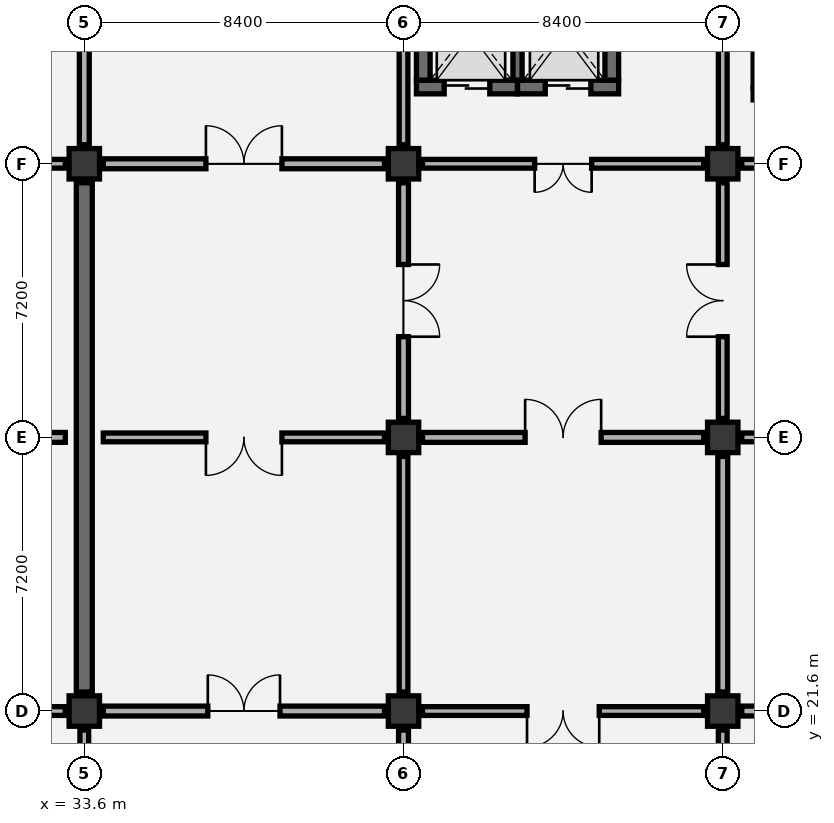
"""IFC4 building model, lengths in metres.
Left out: names, types, materials, properties, quantities, classifications, styles, units other than length and angle.
Written with IfcOpenShell. Run it as: python <this file> out.ifc"""

import sys

from ifc_helpers import new_model, si_unit, direction, frame, frame_2d, origin, origin_2d, place, context, subcontext, project, spatial, rectangle, extrude, element, fill, save


model = new_model("IFC4")
c1 = context("Model", 3, precision=1e-05, world=origin(), true_north=direction((0.0, 1.0)))
c2 = subcontext(c1, "Body", "Model", "MODEL_VIEW")
j1 = project(units=[si_unit("LENGTHUNIT", "METRE"), si_unit("PLANEANGLEUNIT", "RADIAN")], contexts=[c1])
p1 = place(None, origin())
s1 = spatial("IfcSite", under=j1, at=p1, CompositionType="ELEMENT")
p2 = place(p1, origin())
s2 = spatial("IfcBuilding", under=s1, at=p2, CompositionType="ELEMENT")
p3 = place(p2, frame((0.0, 0.0, -9.6)))
s3 = spatial("IfcBuildingStorey", under=s2, at=p3, CompositionType="ELEMENT", Elevation=-9.6)
for number, where, z_axis, x_axis in (
    (1, (33.6, 21.6, 0.0), (0.0, 0.0, 1.0), (1.0, 0.0, 0.0)),
    (2, (33.6, 36.0, 0.0), (0.0, 0.0, 1.0), (1.0, 0.0, 0.0)),
    (3, (42.0, 21.6, 0.0), (0.0, 0.0, 1.0), (1.0, 0.0, 0.0)),
    (4, (42.0, 28.8, 0.0), (0.0, 0.0, 1.0), (1.0, 0.0, 0.0)),
    (5, (42.0, 36.0, 0.0), (0.0, 0.0, 1.0), (1.0, 0.0, 0.0)),
    (6, (50.4, 21.6, 0.0), (0.0, 0.0, 1.0), (1.0, 0.0, 0.0)),
    (7, (50.4, 28.8, 0.0), (0.0, 0.0, 1.0), (1.0, 0.0, 0.0)),
    (8, (50.4, 36.0, 0.0), (0.0, 0.0, 1.0), (1.0, 0.0, 0.0)),
):
    element("IfcColumn", number, at=place(p3, frame(where, z_axis=z_axis, x_axis=x_axis)), inside=s3, PredefinedType="COLUMN", context=c2, shape_type="SweptSolid", body=[
        extrude(rectangle(XDim=0.8, YDim=0.8, at=origin_2d()), origin(), (0.0, 0.0, 1.0), 4.8),
    ])
p4 = place(p3, frame((33.6, 22.1, 0.0), z_axis=(0.0, 0.0, 1.0), x_axis=(0.0, 1.0, 0.0)))
e9 = element("IfcWall", 9, at=p4, inside=s3, PredefinedType="SHEAR", context=c2, shape_type="SweptSolid", body=[
    extrude(rectangle(XDim=13.4, YDim=0.42, at=frame_2d((6.7, 0.0))), origin(), (0.0, 0.0, 1.0), 3.9),
])
p5 = place(p3, frame((51.2, 37.84, 0.0), z_axis=(0.0, 0.0, 1.0), x_axis=(1.0, 0.0, 0.0)))
e10 = element("IfcWall", 10, at=p5, inside=s3, PredefinedType="SHEAR", context=c2, shape_type="SweptSolid", body=[
    extrude(rectangle(XDim=7.48, YDim=0.32, at=frame_2d((3.74, 0.0))), origin(), (0.0, 0.0, 1.0), 4.4),
])
p6 = place(p5, frame((0.45, 0.0, 0.0)))
e11 = element("IfcOpeningElement", 11, at=p6, cuts=e10, PredefinedType="OPENING", context=c2, shape_type="SweptSolid", body=[
    extrude(rectangle(XDim=1.05, YDim=2.15, at=frame_2d((0.525, 1.075))), frame((0.0, 0.17, 0.0), z_axis=(0.0, -1.0, 0.0), x_axis=(1.0, 0.0, 0.0)), (0.0, 0.0, 1.0), 0.34),
])
p7 = place(p3, frame((51.36, 38.0, 0.0), z_axis=(0.0, 0.0, 1.0), x_axis=(0.0, 1.0, 0.0)))
e12 = element("IfcWall", 12, at=p7, inside=s3, PredefinedType="SHEAR", context=c2, shape_type="SweptSolid", body=[
    extrude(rectangle(XDim=3.8, YDim=0.32, at=frame_2d((1.9, 0.0))), origin(), (0.0, 0.0, 1.0), 4.4),
])
p8 = place(p3, frame((42.34, 38.02, -0.75), z_axis=(0.0, 0.0, 1.0), x_axis=(1.0, 0.0, 0.0)))
e13 = element("IfcWall", 13, at=p8, inside=s3, PredefinedType="SHEAR", context=c2, shape_type="SweptSolid", body=[
    extrude(rectangle(XDim=2.66, YDim=0.36, at=frame_2d((1.33, 0.0))), origin(), (0.0, 0.0, 1.0), 5.15),
])
p9 = place(p8, frame((0.73, 0.0, 0.75)))
e14 = element("IfcOpeningElement", 14, at=p9, cuts=e13, PredefinedType="OPENING", context=c2, shape_type="SweptSolid", body=[
    extrude(rectangle(XDim=1.2, YDim=2.15, at=frame_2d((0.6, 1.075))), frame((0.0, 0.19, 0.0), z_axis=(0.0, -1.0, 0.0), x_axis=(1.0, 0.0, 0.0)), (0.0, 0.0, 1.0), 0.38),
])
p10 = place(p3, frame((45.0, 38.02, -0.75), z_axis=(0.0, 0.0, 1.0), x_axis=(1.0, 0.0, 0.0)))
e15 = element("IfcWall", 15, at=p10, inside=s3, PredefinedType="SHEAR", context=c2, shape_type="SweptSolid", body=[
    extrude(rectangle(XDim=2.66, YDim=0.36, at=frame_2d((1.33, 0.0))), origin(), (0.0, 0.0, 1.0), 5.15),
])
p11 = place(p10, frame((0.73, 0.0, 0.75)))
e16 = element("IfcOpeningElement", 16, at=p11, cuts=e15, PredefinedType="OPENING", context=c2, shape_type="SweptSolid", body=[
    extrude(rectangle(XDim=1.2, YDim=2.15, at=frame_2d((0.6, 1.075))), frame((0.0, 0.19, 0.0), z_axis=(0.0, -1.0, 0.0), x_axis=(1.0, 0.0, 0.0)), (0.0, 0.0, 1.0), 0.38),
])
for number, where, z_axis, x_axis in (
    (17, (42.52, 38.2, -0.75), (0.0, 0.0, 1.0), (0.0, 1.0, 0.0)),
    (18, (47.48, 38.2, -0.75), (0.0, 0.0, 1.0), (0.0, 1.0, 0.0)),
):
    element("IfcWall", number, at=place(p3, frame(where, z_axis=z_axis, x_axis=x_axis)), inside=s3, PredefinedType="SHEAR", context=c2, shape_type="SweptSolid", body=[
        extrude(rectangle(XDim=2.8, YDim=0.36, at=frame_2d((1.4, 0.0))), origin(), (0.0, 0.0, 1.0), 5.15),
    ])
p12 = place(p3, frame((45.0, 38.2, -0.75), z_axis=(0.0, 0.0, 1.0), x_axis=(0.0, 1.0, 0.0)))
e19 = element("IfcWall", 19, at=p12, inside=s3, PredefinedType="SHEAR", context=c2, shape_type="SweptSolid", body=[
    extrude(rectangle(XDim=2.8, YDim=0.24, at=frame_2d((1.4, 0.0))), origin(), (0.0, 0.0, 1.0), 5.15),
])
p13 = place(p3, frame((33.6, 14.9, 0.0), z_axis=(0.0, 0.0, 1.0), x_axis=(0.0, 1.0, 0.0)))
e20 = element("IfcWall", 20, at=p13, inside=s3, PredefinedType="PARTITIONING", context=c2, shape_type="SweptSolid", body=[
    extrude(rectangle(XDim=6.2, YDim=0.23, at=frame_2d((3.1, 0.0))), origin(), (0.0, 0.0, 1.0), 3.595),
])
p14 = place(p3, frame((25.7, 21.6, 0.0), z_axis=(0.0, 0.0, 1.0), x_axis=(1.0, 0.0, 0.0)))
e21 = element("IfcWall", 21, at=p14, inside=s3, PredefinedType="PARTITIONING", context=c2, shape_type="SweptSolid", body=[
    extrude(rectangle(XDim=7.4, YDim=0.23, at=frame_2d((3.7, 0.0))), origin(), (0.0, 0.0, 1.0), 2.995),
])
p15 = place(p14, frame((2.7, 0.0, 0.0)))
e22 = element("IfcOpeningElement", 22, at=p15, cuts=e21, PredefinedType="OPENING", context=c2, shape_type="SweptSolid", body=[
    extrude(rectangle(XDim=2.0, YDim=2.35, at=frame_2d((1.0, 1.175))), frame((0.0, 0.125, 0.0), z_axis=(0.0, -1.0, 0.0), x_axis=(1.0, 0.0, 0.0)), (0.0, 0.0, 1.0), 0.25),
])
p16 = place(p3, frame((25.7, 28.8, 0.0), z_axis=(0.0, 0.0, 1.0), x_axis=(1.0, 0.0, 0.0)))
e23 = element("IfcWall", 23, at=p16, inside=s3, PredefinedType="PARTITIONING", context=c2, shape_type="SweptSolid", body=[
    extrude(rectangle(XDim=7.4, YDim=0.26, at=frame_2d((3.7, 0.0))), origin(), (0.0, 0.0, 1.0), 3.9),
])
p17 = place(p3, frame((25.7, 36.0, 0.0), z_axis=(0.0, 0.0, 1.0), x_axis=(1.0, 0.0, 0.0)))
e24 = element("IfcWall", 24, at=p17, inside=s3, PredefinedType="PARTITIONING", context=c2, shape_type="SweptSolid", body=[
    extrude(rectangle(XDim=7.4, YDim=0.23, at=frame_2d((3.7, 0.0))), origin(), (0.0, 0.0, 1.0), 2.995),
])
p18 = place(p17, frame((2.75, 0.0, 0.0)))
e25 = element("IfcOpeningElement", 25, at=p18, cuts=e24, PredefinedType="OPENING", context=c2, shape_type="SweptSolid", body=[
    extrude(rectangle(XDim=1.9, YDim=2.3, at=frame_2d((0.95, 1.15))), frame((0.0, 0.125, 0.0), z_axis=(0.0, -1.0, 0.0), x_axis=(1.0, 0.0, 0.0)), (0.0, 0.0, 1.0), 0.25),
])
p19 = place(p3, frame((33.6, 36.5, 0.0), z_axis=(0.0, 0.0, 1.0), x_axis=(0.0, 1.0, 0.0)))
e26 = element("IfcWall", 26, at=p19, inside=s3, PredefinedType="PARTITIONING", context=c2, shape_type="SweptSolid", body=[
    extrude(rectangle(XDim=6.2, YDim=0.26, at=frame_2d((3.1, 0.0))), origin(), (0.0, 0.0, 1.0), 3.595),
])
p20 = place(p3, frame((42.0, 14.9, 0.0), z_axis=(0.0, 0.0, 1.0), x_axis=(0.0, 1.0, 0.0)))
e27 = element("IfcWall", 27, at=p20, inside=s3, PredefinedType="PARTITIONING", context=c2, shape_type="SweptSolid", body=[
    extrude(rectangle(XDim=6.2, YDim=0.26, at=frame_2d((3.1, 0.0))), origin(), (0.0, 0.0, 1.0), 3.595),
])
p21 = place(p3, frame((34.1, 21.6, 0.0), z_axis=(0.0, 0.0, 1.0), x_axis=(1.0, 0.0, 0.0)))
e28 = element("IfcWall", 28, at=p21, inside=s3, PredefinedType="PARTITIONING", context=c2, shape_type="SweptSolid", body=[
    extrude(rectangle(XDim=7.4, YDim=0.26, at=frame_2d((3.7, 0.0))), origin(), (0.0, 0.0, 1.0), 2.995),
])
p22 = place(p21, frame((2.75, 0.0, 0.0)))
e29 = element("IfcOpeningElement", 29, at=p22, cuts=e28, PredefinedType="OPENING", context=c2, shape_type="SweptSolid", body=[
    extrude(rectangle(XDim=1.9, YDim=2.3, at=frame_2d((0.95, 1.15))), frame((0.0, 0.14, 0.0), z_axis=(0.0, -1.0, 0.0), x_axis=(1.0, 0.0, 0.0)), (0.0, 0.0, 1.0), 0.28),
])
p23 = place(p3, frame((42.0, 22.1, 0.0), z_axis=(0.0, 0.0, 1.0), x_axis=(0.0, 1.0, 0.0)))
e30 = element("IfcWall", 30, at=p23, inside=s3, PredefinedType="PARTITIONING", context=c2, shape_type="SweptSolid", body=[
    extrude(rectangle(XDim=6.2, YDim=0.23, at=frame_2d((3.1, 0.0))), origin(), (0.0, 0.0, 1.0), 3.095),
])
p24 = place(p3, frame((34.1, 28.8, 0.0), z_axis=(0.0, 0.0, 1.0), x_axis=(1.0, 0.0, 0.0)))
e31 = element("IfcWall", 31, at=p24, inside=s3, PredefinedType="PARTITIONING", context=c2, shape_type="SweptSolid", body=[
    extrude(rectangle(XDim=7.4, YDim=0.23, at=frame_2d((3.7, 0.0))), origin(), (0.0, 0.0, 1.0), 3.9),
])
p25 = place(p24, frame((2.7, 0.0, 0.0)))
e32 = element("IfcOpeningElement", 32, at=p25, cuts=e31, PredefinedType="OPENING", context=c2, shape_type="SweptSolid", body=[
    extrude(rectangle(XDim=2.0, YDim=2.35, at=frame_2d((1.0, 1.175))), frame((0.0, 0.125, 0.0), z_axis=(0.0, -1.0, 0.0), x_axis=(1.0, 0.0, 0.0)), (0.0, 0.0, 1.0), 0.25),
])
p26 = place(p3, frame((42.0, 29.3, 0.0), z_axis=(0.0, 0.0, 1.0), x_axis=(0.0, 1.0, 0.0)))
e33 = element("IfcWall", 33, at=p26, inside=s3, PredefinedType="PARTITIONING", context=c2, shape_type="SweptSolid", body=[
    extrude(rectangle(XDim=6.2, YDim=0.26, at=frame_2d((3.1, 0.0))), origin(), (0.0, 0.0, 1.0), 3.095),
])
p27 = place(p26, frame((2.15, 0.0, 0.0)))
e34 = element("IfcOpeningElement", 34, at=p27, cuts=e33, PredefinedType="OPENING", context=c2, shape_type="SweptSolid", body=[
    extrude(rectangle(XDim=1.9, YDim=2.3, at=frame_2d((0.95, 1.15))), frame((0.0, 0.14, 0.0), z_axis=(0.0, -1.0, 0.0), x_axis=(1.0, 0.0, 0.0)), (0.0, 0.0, 1.0), 0.28),
])
p28 = place(p3, frame((34.1, 36.0, 0.0), z_axis=(0.0, 0.0, 1.0), x_axis=(1.0, 0.0, 0.0)))
e35 = element("IfcWall", 35, at=p28, inside=s3, PredefinedType="PARTITIONING", context=c2, shape_type="SweptSolid", body=[
    extrude(rectangle(XDim=7.4, YDim=0.26, at=frame_2d((3.7, 0.0))), origin(), (0.0, 0.0, 1.0), 2.995),
])
p29 = place(p28, frame((2.7, 0.0, 0.0)))
e36 = element("IfcOpeningElement", 36, at=p29, cuts=e35, PredefinedType="OPENING", context=c2, shape_type="SweptSolid", body=[
    extrude(rectangle(XDim=2.0, YDim=2.35, at=frame_2d((1.0, 1.175))), frame((0.0, 0.14, 0.0), z_axis=(0.0, -1.0, 0.0), x_axis=(1.0, 0.0, 0.0)), (0.0, 0.0, 1.0), 0.28),
])
p30 = place(p3, frame((42.0, 36.5, 0.0), z_axis=(0.0, 0.0, 1.0), x_axis=(0.0, 1.0, 0.0)))
e37 = element("IfcWall", 37, at=p30, inside=s3, PredefinedType="PARTITIONING", context=c2, shape_type="SweptSolid", body=[
    extrude(rectangle(XDim=6.2, YDim=0.23, at=frame_2d((3.1, 0.0))), origin(), (0.0, 0.0, 1.0), 3.595),
])
p31 = place(p3, frame((50.4, 14.9, 0.0), z_axis=(0.0, 0.0, 1.0), x_axis=(0.0, 1.0, 0.0)))
e38 = element("IfcWall", 38, at=p31, inside=s3, PredefinedType="PARTITIONING", context=c2, shape_type="SweptSolid", body=[
    extrude(rectangle(XDim=6.2, YDim=0.23, at=frame_2d((3.1, 0.0))), origin(), (0.0, 0.0, 1.0), 3.595),
])
p32 = place(p3, frame((42.5, 21.6, 0.0), z_axis=(0.0, 0.0, 1.0), x_axis=(1.0, 0.0, 0.0)))
e39 = element("IfcWall", 39, at=p32, inside=s3, PredefinedType="PARTITIONING", context=c2, shape_type="SweptSolid", body=[
    extrude(rectangle(XDim=7.4, YDim=0.23, at=frame_2d((3.7, 0.0))), origin(), (0.0, 0.0, 1.0), 3.495),
])
p33 = place(p32, frame((2.75, 0.0, 0.0)))
e40 = element("IfcOpeningElement", 40, at=p33, cuts=e39, PredefinedType="OPENING", context=c2, shape_type="SweptSolid", body=[
    extrude(rectangle(XDim=1.9, YDim=2.3, at=frame_2d((0.95, 1.15))), frame((0.0, 0.125, 0.0), z_axis=(0.0, -1.0, 0.0), x_axis=(1.0, 0.0, 0.0)), (0.0, 0.0, 1.0), 0.25),
])
p34 = place(p3, frame((50.4, 22.1, 0.0), z_axis=(0.0, 0.0, 1.0), x_axis=(0.0, 1.0, 0.0)))
e41 = element("IfcWall", 41, at=p34, inside=s3, PredefinedType="PARTITIONING", context=c2, shape_type="SweptSolid", body=[
    extrude(rectangle(XDim=6.2, YDim=0.26, at=frame_2d((3.1, 0.0))), origin(), (0.0, 0.0, 1.0), 3.595),
])
p35 = place(p3, frame((42.5, 28.8, 0.0), z_axis=(0.0, 0.0, 1.0), x_axis=(1.0, 0.0, 0.0)))
e42 = element("IfcWall", 42, at=p35, inside=s3, PredefinedType="PARTITIONING", context=c2, shape_type="SweptSolid", body=[
    extrude(rectangle(XDim=7.4, YDim=0.26, at=frame_2d((3.7, 0.0))), origin(), (0.0, 0.0, 1.0), 3.495),
])
p36 = place(p35, frame((2.7, 0.0, 0.0)))
e43 = element("IfcOpeningElement", 43, at=p36, cuts=e42, PredefinedType="OPENING", context=c2, shape_type="SweptSolid", body=[
    extrude(rectangle(XDim=2.0, YDim=2.35, at=frame_2d((1.0, 1.175))), frame((0.0, 0.14, 0.0), z_axis=(0.0, -1.0, 0.0), x_axis=(1.0, 0.0, 0.0)), (0.0, 0.0, 1.0), 0.28),
])
p37 = place(p3, frame((50.4, 29.3, 0.0), z_axis=(0.0, 0.0, 1.0), x_axis=(0.0, 1.0, 0.0)))
e44 = element("IfcWall", 44, at=p37, inside=s3, PredefinedType="PARTITIONING", context=c2, shape_type="SweptSolid", body=[
    extrude(rectangle(XDim=6.2, YDim=0.23, at=frame_2d((3.1, 0.0))), origin(), (0.0, 0.0, 1.0), 3.595),
])
p38 = place(p37, frame((2.15, 0.0, 0.0)))
e45 = element("IfcOpeningElement", 45, at=p38, cuts=e44, PredefinedType="OPENING", context=c2, shape_type="SweptSolid", body=[
    extrude(rectangle(XDim=1.9, YDim=2.3, at=frame_2d((0.95, 1.15))), frame((0.0, 0.125, 0.0), z_axis=(0.0, -1.0, 0.0), x_axis=(1.0, 0.0, 0.0)), (0.0, 0.0, 1.0), 0.25),
])
p39 = place(p3, frame((42.5, 36.0, 0.0), z_axis=(0.0, 0.0, 1.0), x_axis=(1.0, 0.0, 0.0)))
e46 = element("IfcWall", 46, at=p39, inside=s3, PredefinedType="PARTITIONING", context=c2, shape_type="SweptSolid", body=[
    extrude(rectangle(XDim=7.4, YDim=0.23, at=frame_2d((3.7, 0.0))), origin(), (0.0, 0.0, 1.0), 3.495),
])
p40 = place(p39, frame((2.95, 0.0, 0.0)))
e47 = element("IfcOpeningElement", 47, at=p40, cuts=e46, PredefinedType="OPENING", context=c2, shape_type="SweptSolid", body=[
    extrude(rectangle(XDim=1.5, YDim=2.15, at=frame_2d((0.75, 1.075))), frame((0.0, 0.125, 0.0), z_axis=(0.0, -1.0, 0.0), x_axis=(1.0, 0.0, 0.0)), (0.0, 0.0, 1.0), 0.25),
])
p41 = place(p3, frame((50.4, 36.5, 0.0), z_axis=(0.0, 0.0, 1.0), x_axis=(0.0, 1.0, 0.0)))
e48 = element("IfcWall", 48, at=p41, inside=s3, PredefinedType="PARTITIONING", context=c2, shape_type="SweptSolid", body=[
    extrude(rectangle(XDim=6.2, YDim=0.23, at=frame_2d((3.1, 0.0))), origin(), (0.0, 0.0, 1.0), 3.595),
])
p42 = place(p3, frame((50.9, 21.6, 0.0), z_axis=(0.0, 0.0, 1.0), x_axis=(1.0, 0.0, 0.0)))
e49 = element("IfcWall", 49, at=p42, inside=s3, PredefinedType="PARTITIONING", context=c2, shape_type="SweptSolid", body=[
    extrude(rectangle(XDim=7.4, YDim=0.26, at=frame_2d((3.7, 0.0))), origin(), (0.0, 0.0, 1.0), 3.495),
])
p43 = place(p42, frame((2.75, 0.0, 0.0)))
e50 = element("IfcOpeningElement", 50, at=p43, cuts=e49, PredefinedType="OPENING", context=c2, shape_type="SweptSolid", body=[
    extrude(rectangle(XDim=1.9, YDim=2.3, at=frame_2d((0.95, 1.15))), frame((0.0, 0.14, 0.0), z_axis=(0.0, -1.0, 0.0), x_axis=(1.0, 0.0, 0.0)), (0.0, 0.0, 1.0), 0.28),
])
p44 = place(p3, frame((50.9, 28.8, 0.0), z_axis=(0.0, 0.0, 1.0), x_axis=(1.0, 0.0, 0.0)))
e51 = element("IfcWall", 51, at=p44, inside=s3, PredefinedType="PARTITIONING", context=c2, shape_type="SweptSolid", body=[
    extrude(rectangle(XDim=7.4, YDim=0.23, at=frame_2d((3.7, 0.0))), origin(), (0.0, 0.0, 1.0), 3.495),
])
p45 = place(p44, frame((2.7, 0.0, 0.0)))
e52 = element("IfcOpeningElement", 52, at=p45, cuts=e51, PredefinedType="OPENING", context=c2, shape_type="SweptSolid", body=[
    extrude(rectangle(XDim=2.0, YDim=2.35, at=frame_2d((1.0, 1.175))), frame((0.0, 0.125, 0.0), z_axis=(0.0, -1.0, 0.0), x_axis=(1.0, 0.0, 0.0)), (0.0, 0.0, 1.0), 0.25),
])
p46 = place(p3, frame((50.9, 36.0, 0.0), z_axis=(0.0, 0.0, 1.0), x_axis=(1.0, 0.0, 0.0)))
e53 = element("IfcWall", 53, at=p46, inside=s3, PredefinedType="PARTITIONING", context=c2, shape_type="SweptSolid", body=[
    extrude(rectangle(XDim=7.4, YDim=0.23, at=frame_2d((3.7, 0.0))), origin(), (0.0, 0.0, 1.0), 3.495),
])
p47 = place(p46, frame((2.95, 0.0, 0.0)))
e54 = element("IfcOpeningElement", 54, at=p47, cuts=e53, PredefinedType="OPENING", context=c2, shape_type="SweptSolid", body=[
    extrude(rectangle(XDim=1.5, YDim=2.15, at=frame_2d((0.75, 1.075))), frame((0.0, 0.125, 0.0), z_axis=(0.0, -1.0, 0.0), x_axis=(1.0, 0.0, 0.0)), (0.0, 0.0, 1.0), 0.25),
])
p48 = place(p9, origin())
e55 = element("IfcDoor", 55, at=p48, inside=s3, OperationType="DOUBLE_DOOR_SLIDING", PredefinedType="DOOR", context=c2, shape_type="SweptSolid", body=[
    extrude(rectangle(XDim=1.2, YDim=2.15, at=frame_2d((0.6, 1.075))), frame((0.0, 0.025, 0.0), z_axis=(0.0, -1.0, 0.0), x_axis=(1.0, 0.0, 0.0)), (0.0, 0.0, 1.0), 0.05),
])
fill(e14, e55)
p49 = place(p11, origin())
e56 = element("IfcDoor", 56, at=p49, inside=s3, OperationType="DOUBLE_DOOR_SLIDING", PredefinedType="DOOR", context=c2, shape_type="SweptSolid", body=[
    extrude(rectangle(XDim=1.2, YDim=2.15, at=frame_2d((0.6, 1.075))), frame((0.0, 0.025, 0.0), z_axis=(0.0, -1.0, 0.0), x_axis=(1.0, 0.0, 0.0)), (0.0, 0.0, 1.0), 0.05),
])
fill(e16, e56)
p50 = place(p22, origin())
e57 = element("IfcDoor", 57, at=p50, inside=s3, OperationType="DOUBLE_DOOR_SINGLE_SWING", PredefinedType="DOOR", context=c2, shape_type="SweptSolid", body=[
    extrude(rectangle(XDim=1.9, YDim=2.3, at=frame_2d((0.95, 1.15))), frame((0.0, 0.025, 0.0), z_axis=(0.0, -1.0, 0.0), x_axis=(1.0, 0.0, 0.0)), (0.0, 0.0, 1.0), 0.05),
])
fill(e29, e57)
p51 = place(p25, frame((2.0, 0.0, 0.0), z_axis=(0.0, 0.0, 1.0), x_axis=(-1.0, 0.0, 0.0)))
e58 = element("IfcDoor", 58, at=p51, inside=s3, OperationType="DOUBLE_DOOR_SINGLE_SWING", PredefinedType="DOOR", context=c2, shape_type="SweptSolid", body=[
    extrude(rectangle(XDim=2.0, YDim=2.35, at=frame_2d((1.0, 1.175))), frame((0.0, 0.025, 0.0), z_axis=(0.0, -1.0, 0.0), x_axis=(1.0, 0.0, 0.0)), (0.0, 0.0, 1.0), 0.05),
])
fill(e32, e58)
p52 = place(p27, frame((1.9, 0.0, 0.0), z_axis=(0.0, 0.0, 1.0), x_axis=(-1.0, 0.0, 0.0)))
e59 = element("IfcDoor", 59, at=p52, inside=s3, OperationType="DOUBLE_DOOR_SINGLE_SWING", PredefinedType="DOOR", context=c2, shape_type="SweptSolid", body=[
    extrude(rectangle(XDim=1.9, YDim=2.3, at=frame_2d((0.95, 1.15))), frame((0.0, 0.025, 0.0), z_axis=(0.0, -1.0, 0.0), x_axis=(1.0, 0.0, 0.0)), (0.0, 0.0, 1.0), 0.05),
])
fill(e34, e59)
p53 = place(p29, origin())
e60 = element("IfcDoor", 60, at=p53, inside=s3, OperationType="DOUBLE_DOOR_SINGLE_SWING", PredefinedType="DOOR", context=c2, shape_type="SweptSolid", body=[
    extrude(rectangle(XDim=2.0, YDim=2.35, at=frame_2d((1.0, 1.175))), frame((0.0, 0.025, 0.0), z_axis=(0.0, -1.0, 0.0), x_axis=(1.0, 0.0, 0.0)), (0.0, 0.0, 1.0), 0.05),
])
fill(e36, e60)
p54 = place(p33, frame((1.9, 0.0, 0.0), z_axis=(0.0, 0.0, 1.0), x_axis=(-1.0, 0.0, 0.0)))
e61 = element("IfcDoor", 61, at=p54, inside=s3, OperationType="DOUBLE_DOOR_SINGLE_SWING", PredefinedType="DOOR", context=c2, shape_type="SweptSolid", body=[
    extrude(rectangle(XDim=1.9, YDim=2.3, at=frame_2d((0.95, 1.15))), frame((0.0, 0.025, 0.0), z_axis=(0.0, -1.0, 0.0), x_axis=(1.0, 0.0, 0.0)), (0.0, 0.0, 1.0), 0.05),
])
fill(e40, e61)
p55 = place(p36, origin())
e62 = element("IfcDoor", 62, at=p55, inside=s3, OperationType="DOUBLE_DOOR_SINGLE_SWING", PredefinedType="DOOR", context=c2, shape_type="SweptSolid", body=[
    extrude(rectangle(XDim=2.0, YDim=2.35, at=frame_2d((1.0, 1.175))), frame((0.0, 0.025, 0.0), z_axis=(0.0, -1.0, 0.0), x_axis=(1.0, 0.0, 0.0)), (0.0, 0.0, 1.0), 0.05),
])
fill(e43, e62)
p56 = place(p38, origin())
e63 = element("IfcDoor", 63, at=p56, inside=s3, OperationType="DOUBLE_DOOR_SINGLE_SWING", PredefinedType="DOOR", context=c2, shape_type="SweptSolid", body=[
    extrude(rectangle(XDim=1.9, YDim=2.3, at=frame_2d((0.95, 1.15))), frame((0.0, 0.025, 0.0), z_axis=(0.0, -1.0, 0.0), x_axis=(1.0, 0.0, 0.0)), (0.0, 0.0, 1.0), 0.05),
])
fill(e45, e63)
p57 = place(p40, frame((1.5, 0.0, 0.0), z_axis=(0.0, 0.0, 1.0), x_axis=(-1.0, 0.0, 0.0)))
e64 = element("IfcDoor", 64, at=p57, inside=s3, OperationType="DOUBLE_DOOR_SINGLE_SWING", PredefinedType="DOOR", context=c2, shape_type="SweptSolid", body=[
    extrude(rectangle(XDim=1.5, YDim=2.15, at=frame_2d((0.75, 1.075))), frame((0.0, 0.025, 0.0), z_axis=(0.0, -1.0, 0.0), x_axis=(1.0, 0.0, 0.0)), (0.0, 0.0, 1.0), 0.05),
])
fill(e47, e64)
save(model, sys.argv[1])
